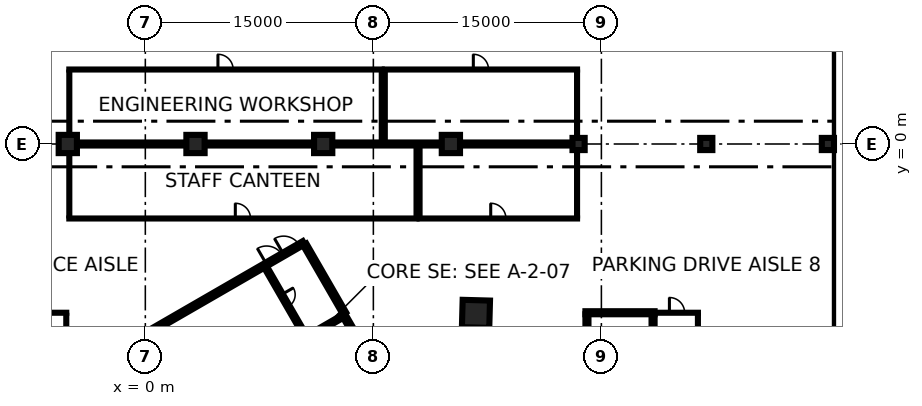
"""IFC4 building model, lengths in metres.
Left out: names, types, materials, properties, quantities, classifications, styles, units other than length and angle.
Written with IfcOpenShell. Run it as: python <this file> out.ifc"""

import sys

from ifc_helpers import new_model, si_unit, direction, frame, frame_2d, origin, origin_2d, place, context, subcontext, project, spatial, rectangle, extrude, element, fill, save


model = new_model("IFC4")
c1 = context("Model", 3, precision=1e-05, world=origin(), true_north=direction((0.0, 1.0)))
c2 = subcontext(c1, "Body", "Model", "MODEL_VIEW")
j1 = project(units=[si_unit("LENGTHUNIT", "METRE"), si_unit("PLANEANGLEUNIT", "RADIAN")], contexts=[c1])
p1 = place(None, origin())
s1 = spatial("IfcSite", under=j1, at=p1, CompositionType="ELEMENT")
p2 = place(p1, origin())
s2 = spatial("IfcBuilding", under=s1, at=p2, CompositionType="ELEMENT")
p3 = place(p2, frame((0.0, 0.0, -12.0)))
s3 = spatial("IfcBuildingStorey", under=s2, at=p3, CompositionType="ELEMENT", Elevation=-12.0)
p4 = place(p3, frame((45.75, -80.0, 0.0), z_axis=(0.0, 0.0, 1.0), x_axis=(0.0, 1.0, 0.0)))
e1 = element("IfcWall", 1, at=p4, inside=s3, PredefinedType="USERDEFINED", context=c2, shape_type="SweptSolid", body=[
    extrude(rectangle(XDim=160.0, YDim=0.9, at=frame_2d((80.0, 0.0))), origin(), (0.0, 0.0, 1.0), 11.55),
])
p5 = place(p2, frame((0.0, 0.0, -3.6)))
s4 = spatial("IfcBuildingStorey", under=s2, at=p5, CompositionType="ELEMENT", Elevation=-3.6)
p6 = place(p5, frame((21.749, -11.174, -0.4), z_axis=(0.0, 0.0, 1.0), x_axis=(-0.999628128016, 0.02726913418, 0.0)))
e2 = element("IfcColumn", 2, at=p6, inside=s4, PredefinedType="COLUMN", context=c2, shape_type="SweptSolid", body=[
    extrude(rectangle(XDim=1.8, YDim=1.8, at=origin_2d()), origin(), (0.0, 0.0, 1.0), 3.55),
])
for number, where, z_axis, x_axis in (
    (3, (-5.1, 0.0, -0.4), (0.0, 0.0, 1.0), (1.0, 0.0, 0.0)),
    (4, (3.3, 0.0, -0.4), (0.0, 0.0, 1.0), (1.0, 0.0, 0.0)),
    (5, (11.7, 0.0, -0.4), (0.0, 0.0, 1.0), (1.0, 0.0, 0.0)),
    (6, (20.1, 0.0, -0.4), (0.0, 0.0, 1.0), (1.0, 0.0, 0.0)),
):
    element("IfcColumn", number, at=place(p5, frame(where, z_axis=z_axis, x_axis=x_axis)), inside=s4, PredefinedType="COLUMN", context=c2, shape_type="SweptSolid", body=[
        extrude(rectangle(XDim=1.2, YDim=1.2, at=origin_2d()), origin(), (0.0, 0.0, 1.0), 3.55),
    ])
for number, where, z_axis, x_axis in (
    (7, (28.5, 0.0, -0.4), (0.0, 0.0, 1.0), (1.0, 0.0, 0.0)),
    (8, (36.9, 0.0, -0.4), (0.0, 0.0, 1.0), (1.0, 0.0, 0.0)),
    (9, (44.9, 0.0, -0.4), (0.0, 0.0, 1.0), (1.0, 0.0, 0.0)),
):
    element("IfcColumn", number, at=place(p5, frame(where, z_axis=z_axis, x_axis=x_axis)), inside=s4, PredefinedType="COLUMN", context=c2, shape_type="SweptSolid", body=[
        extrude(rectangle(XDim=0.8, YDim=0.8, at=origin_2d()), origin(), (0.0, 0.0, 1.0), 3.55),
    ])
p7 = place(p5, frame((0.417, -12.273, 0.0), z_axis=(0.0, 0.0, 1.0), x_axis=(0.866021906294, 0.500006057782, 0.0)))
e10 = element("IfcWall", 10, at=p7, inside=s4, PredefinedType="SHEAR", context=c2, shape_type="SweptSolid", body=[
    extrude(rectangle(XDim=11.55, YDim=0.25, at=frame_2d((5.775, 0.0))), origin(), (0.0, 0.0, 1.0), 3.15),
])
p8 = place(p7, frame((10.025, 0.0, 0.0)))
e11 = element("IfcOpeningElement", 11, at=p8, cuts=e10, PredefinedType="OPENING", context=c2, shape_type="SweptSolid", body=[
    extrude(rectangle(XDim=1.2, YDim=2.1, at=frame_2d((0.6, 1.05))), frame((0.0, 0.135, 0.0), z_axis=(0.0, -1.0, 0.0), x_axis=(1.0, 0.0, 0.0)), (0.0, 0.0, 1.0), 0.27),
])
p9 = place(p7, frame((8.725, 0.0, 0.0)))
e12 = element("IfcOpeningElement", 12, at=p9, cuts=e10, PredefinedType="OPENING", context=c2, shape_type="SweptSolid", body=[
    extrude(rectangle(XDim=1.2, YDim=2.1, at=frame_2d((0.6, 1.05))), frame((0.0, 0.135, 0.0), z_axis=(0.0, -1.0, 0.0), x_axis=(1.0, 0.0, 0.0)), (0.0, 0.0, 1.0), 0.27),
])
p10 = place(p5, frame((13.008, -11.181, 0.0), z_axis=(0.0, 0.0, 1.0), x_axis=(0.500004234368, -0.866022959057, 0.0)))
e13 = element("IfcWall", 13, at=p10, inside=s4, PredefinedType="SHEAR", context=c2, shape_type="SweptSolid", body=[
    extrude(rectangle(XDim=6.25, YDim=0.25, at=frame_2d((3.125, 0.0))), origin(), (0.0, 0.0, 1.0), 3.15),
])
p11 = place(p5, frame((10.483, -6.606, 0.0), z_axis=(0.0, 0.0, 1.0), x_axis=(0.49999885962, -0.866026062182, 0.0)))
e14 = element("IfcWall", 14, at=p11, inside=s4, PredefinedType="SHEAR", context=c2, shape_type="SweptSolid", body=[
    extrude(rectangle(XDim=5.225, YDim=0.25, at=frame_2d((2.612, 0.0))), origin(), (0.0, 0.0, 1.0), 3.15),
])
p12 = place(p5, frame((7.906, -8.094, 0.0), z_axis=(0.0, 0.0, 1.0), x_axis=(0.500012186204, -0.866018367962, 0.0)))
e15 = element("IfcWall", 15, at=p12, inside=s4, PredefinedType="SHEAR", context=c2, shape_type="SweptSolid", body=[
    extrude(rectangle(XDim=5.349, YDim=0.2, at=frame_2d((2.674, 0.0))), origin(), (0.0, 0.0, 1.0), 3.15),
])
p13 = place(p12, frame((2.099, 0.0, 0.0)))
e16 = element("IfcOpeningElement", 16, at=p13, cuts=e15, PredefinedType="OPENING", context=c2, shape_type="SweptSolid", body=[
    extrude(rectangle(XDim=0.9, YDim=2.1, at=frame_2d((0.45, 1.05))), frame((0.0, 0.11, 0.0), z_axis=(0.0, -1.0, 0.0), x_axis=(1.0, 0.0, 0.0)), (0.0, 0.0, 1.0), 0.22),
])
p14 = place(p5, frame((10.668, -12.677, 0.0), z_axis=(0.0, 0.0, 1.0), x_axis=(0.866016748302, 0.500014991436, 0.0)))
e17 = element("IfcWall", 17, at=p14, inside=s4, PredefinedType="SHEAR", context=c2, shape_type="SweptSolid", body=[
    extrude(rectangle(XDim=2.649, YDim=0.2, at=frame_2d((1.324, 0.0))), origin(), (0.0, 0.0, 1.0), 3.15),
])
p15 = place(p14, frame((0.65, 0.0, 0.0)))
e18 = element("IfcOpeningElement", 18, at=p15, cuts=e17, PredefinedType="OPENING", context=c2, shape_type="SweptSolid", body=[
    extrude(rectangle(XDim=1.3, YDim=2.1, at=frame_2d((0.65, 1.05))), frame((0.0, 0.11, 0.0), z_axis=(0.0, -1.0, 0.0), x_axis=(1.0, 0.0, 0.0)), (0.0, 0.0, 1.0), 0.22),
])
p16 = place(p5, frame((-13.5, -11.1, 0.0), z_axis=(0.0, 0.0, 1.0), x_axis=(1.0, 0.0, 0.0)))
e19 = element("IfcWall", 19, at=p16, inside=s4, PredefinedType="PARTITIONING", context=c2, shape_type="SweptSolid", body=[
    extrude(rectangle(XDim=8.4, YDim=0.2, at=frame_2d((4.2, 0.0))), origin(), (0.0, 0.0, 1.0), 3.15),
])
p17 = place(p16, frame((3.7, 0.0, 0.0)))
e20 = element("IfcOpeningElement", 20, at=p17, cuts=e19, PredefinedType="OPENING", context=c2, shape_type="SweptSolid", body=[
    extrude(rectangle(XDim=1.0, YDim=2.1, at=frame_2d((0.5, 1.05))), frame((0.0, 0.11, 0.0), z_axis=(0.0, -1.0, 0.0), x_axis=(1.0, 0.0, 0.0)), (0.0, 0.0, 1.0), 0.22),
])
p18 = place(p5, frame((-5.2, -15.4, 0.0), z_axis=(0.0, 0.0, 1.0), x_axis=(0.0, 1.0, 0.0)))
e21 = element("IfcWall", 21, at=p18, inside=s4, PredefinedType="PARTITIONING", context=c2, shape_type="SweptSolid", body=[
    extrude(rectangle(XDim=4.2, YDim=0.2, at=frame_2d((2.1, 0.0))), origin(), (0.0, 0.0, 1.0), 3.15),
])
p19 = place(p5, frame((-5.1, -4.9, 0.0), z_axis=(0.0, 0.0, 1.0), x_axis=(1.0, 0.0, 0.0)))
e22 = element("IfcWall", 22, at=p19, inside=s4, PredefinedType="PARTITIONING", context=c2, shape_type="SweptSolid", body=[
    extrude(rectangle(XDim=23.04, YDim=0.2, at=frame_2d((11.52, 0.0))), origin(), (0.0, 0.0, 1.0), 3.15),
])
p20 = place(p19, frame((11.02, 0.0, 0.0)))
e23 = element("IfcOpeningElement", 23, at=p20, cuts=e22, PredefinedType="OPENING", context=c2, shape_type="SweptSolid", body=[
    extrude(rectangle(XDim=1.0, YDim=2.1, at=frame_2d((0.5, 1.05))), frame((0.0, 0.11, 0.0), z_axis=(0.0, -1.0, 0.0), x_axis=(1.0, 0.0, 0.0)), (0.0, 0.0, 1.0), 0.22),
])
p21 = place(p5, frame((-5.1, -0.1, 0.0), z_axis=(0.0, 0.0, 1.0), x_axis=(1.0, 0.0, 0.0)))
e24 = element("IfcWall", 24, at=p21, inside=s4, PredefinedType="PARTITIONING", context=c2, shape_type="SweptSolid", body=[
    extrude(rectangle(XDim=23.04, YDim=0.2, at=frame_2d((11.52, 0.0))), origin(), (0.0, 0.0, 1.0), 3.15),
])
p22 = place(p5, frame((-5.0, -4.8, 0.0), z_axis=(0.0, 0.0, 1.0), x_axis=(0.0, 1.0, 0.0)))
e25 = element("IfcWall", 25, at=p22, inside=s4, PredefinedType="PARTITIONING", context=c2, shape_type="SweptSolid", body=[
    extrude(rectangle(XDim=4.2, YDim=0.2, at=frame_2d((2.1, 0.0))), origin(), (0.0, 0.0, 1.0), 3.15),
])
p23 = place(p5, frame((17.84, -4.8, 0.0), z_axis=(0.0, 0.0, 1.0), x_axis=(0.0, 1.0, 0.0)))
e26 = element("IfcWall", 26, at=p23, inside=s4, PredefinedType="PARTITIONING", context=c2, shape_type="SweptSolid", body=[
    extrude(rectangle(XDim=4.6, YDim=0.2, at=frame_2d((2.3, 0.0))), origin(), (0.0, 0.0, 1.0), 3.15),
])
p24 = place(p5, frame((17.94, -4.9, 0.0), z_axis=(0.0, 0.0, 1.0), x_axis=(1.0, 0.0, 0.0)))
e27 = element("IfcWall", 27, at=p24, inside=s4, PredefinedType="PARTITIONING", context=c2, shape_type="SweptSolid", body=[
    extrude(rectangle(XDim=10.56, YDim=0.2, at=frame_2d((5.28, 0.0))), origin(), (0.0, 0.0, 1.0), 3.15),
])
p25 = place(p24, frame((4.78, 0.0, 0.0)))
e28 = element("IfcOpeningElement", 28, at=p25, cuts=e27, PredefinedType="OPENING", context=c2, shape_type="SweptSolid", body=[
    extrude(rectangle(XDim=1.0, YDim=2.1, at=frame_2d((0.5, 1.05))), frame((0.0, 0.11, 0.0), z_axis=(0.0, -1.0, 0.0), x_axis=(1.0, 0.0, 0.0)), (0.0, 0.0, 1.0), 0.22),
])
p26 = place(p5, frame((17.94, -0.1, 0.0), z_axis=(0.0, 0.0, 1.0), x_axis=(1.0, 0.0, 0.0)))
e29 = element("IfcWall", 29, at=p26, inside=s4, PredefinedType="PARTITIONING", context=c2, shape_type="SweptSolid", body=[
    extrude(rectangle(XDim=10.56, YDim=0.2, at=frame_2d((5.28, 0.0))), origin(), (0.0, 0.0, 1.0), 3.15),
])
p27 = place(p5, frame((18.04, -4.8, 0.0), z_axis=(0.0, 0.0, 1.0), x_axis=(0.0, 1.0, 0.0)))
e30 = element("IfcWall", 30, at=p27, inside=s4, PredefinedType="PARTITIONING", context=c2, shape_type="SweptSolid", body=[
    extrude(rectangle(XDim=4.6, YDim=0.2, at=frame_2d((2.3, 0.0))), origin(), (0.0, 0.0, 1.0), 3.15),
])
p28 = place(p5, frame((28.4, -4.8, 0.0), z_axis=(0.0, 0.0, 1.0), x_axis=(0.0, 1.0, 0.0)))
e31 = element("IfcWall", 31, at=p28, inside=s4, PredefinedType="PARTITIONING", context=c2, shape_type="SweptSolid", body=[
    extrude(rectangle(XDim=4.4, YDim=0.2, at=frame_2d((2.2, 0.0))), origin(), (0.0, 0.0, 1.0), 3.15),
])
p29 = place(p5, frame((-5.1, 0.1, 0.0), z_axis=(0.0, 0.0, 1.0), x_axis=(1.0, 0.0, 0.0)))
e32 = element("IfcWall", 32, at=p29, inside=s4, PredefinedType="PARTITIONING", context=c2, shape_type="SweptSolid", body=[
    extrude(rectangle(XDim=20.753, YDim=0.2, at=frame_2d((10.376, 0.0))), origin(), (0.0, 0.0, 1.0), 3.15),
])
p30 = place(p5, frame((-5.1, 4.9, 0.0), z_axis=(0.0, 0.0, 1.0), x_axis=(1.0, 0.0, 0.0)))
e33 = element("IfcWall", 33, at=p30, inside=s4, PredefinedType="PARTITIONING", context=c2, shape_type="SweptSolid", body=[
    extrude(rectangle(XDim=20.753, YDim=0.2, at=frame_2d((10.376, 0.0))), origin(), (0.0, 0.0, 1.0), 3.15),
])
p31 = place(p30, frame((9.876, 0.0, 0.0)))
e34 = element("IfcOpeningElement", 34, at=p31, cuts=e33, PredefinedType="OPENING", context=c2, shape_type="SweptSolid", body=[
    extrude(rectangle(XDim=1.0, YDim=2.1, at=frame_2d((0.5, 1.05))), frame((0.0, 0.11, 0.0), z_axis=(0.0, -1.0, 0.0), x_axis=(1.0, 0.0, 0.0)), (0.0, 0.0, 1.0), 0.22),
])
p32 = place(p5, frame((-5.0, 0.6, 0.0), z_axis=(0.0, 0.0, 1.0), x_axis=(0.0, 1.0, 0.0)))
e35 = element("IfcWall", 35, at=p32, inside=s4, PredefinedType="PARTITIONING", context=c2, shape_type="SweptSolid", body=[
    extrude(rectangle(XDim=4.2, YDim=0.2, at=frame_2d((2.1, 0.0))), origin(), (0.0, 0.0, 1.0), 3.15),
])
p33 = place(p5, frame((15.553, 0.2, 0.0), z_axis=(0.0, 0.0, 1.0), x_axis=(0.0, 1.0, 0.0)))
e36 = element("IfcWall", 36, at=p33, inside=s4, PredefinedType="PARTITIONING", context=c2, shape_type="SweptSolid", body=[
    extrude(rectangle(XDim=4.6, YDim=0.2, at=frame_2d((2.3, 0.0))), origin(), (0.0, 0.0, 1.0), 3.15),
])
p34 = place(p5, frame((15.653, 0.1, 0.0), z_axis=(0.0, 0.0, 1.0), x_axis=(1.0, 0.0, 0.0)))
e37 = element("IfcWall", 37, at=p34, inside=s4, PredefinedType="PARTITIONING", context=c2, shape_type="SweptSolid", body=[
    extrude(rectangle(XDim=12.847, YDim=0.2, at=frame_2d((6.424, 0.0))), origin(), (0.0, 0.0, 1.0), 3.15),
])
p35 = place(p5, frame((15.653, 4.9, 0.0), z_axis=(0.0, 0.0, 1.0), x_axis=(1.0, 0.0, 0.0)))
e38 = element("IfcWall", 38, at=p35, inside=s4, PredefinedType="PARTITIONING", context=c2, shape_type="SweptSolid", body=[
    extrude(rectangle(XDim=12.847, YDim=0.2, at=frame_2d((6.424, 0.0))), origin(), (0.0, 0.0, 1.0), 3.15),
])
p36 = place(p35, frame((5.924, 0.0, 0.0)))
e39 = element("IfcOpeningElement", 39, at=p36, cuts=e38, PredefinedType="OPENING", context=c2, shape_type="SweptSolid", body=[
    extrude(rectangle(XDim=1.0, YDim=2.1, at=frame_2d((0.5, 1.05))), frame((0.0, 0.11, 0.0), z_axis=(0.0, -1.0, 0.0), x_axis=(1.0, 0.0, 0.0)), (0.0, 0.0, 1.0), 0.22),
])
p37 = place(p5, frame((15.753, 0.2, 0.0), z_axis=(0.0, 0.0, 1.0), x_axis=(0.0, 1.0, 0.0)))
e40 = element("IfcWall", 40, at=p37, inside=s4, PredefinedType="PARTITIONING", context=c2, shape_type="SweptSolid", body=[
    extrude(rectangle(XDim=4.6, YDim=0.2, at=frame_2d((2.3, 0.0))), origin(), (0.0, 0.0, 1.0), 3.15),
])
p38 = place(p5, frame((28.4, 0.4, 0.0), z_axis=(0.0, 0.0, 1.0), x_axis=(0.0, 1.0, 0.0)))
e41 = element("IfcWall", 41, at=p38, inside=s4, PredefinedType="PARTITIONING", context=c2, shape_type="SweptSolid", body=[
    extrude(rectangle(XDim=4.4, YDim=0.2, at=frame_2d((2.2, 0.0))), origin(), (0.0, 0.0, 1.0), 3.15),
])
p39 = place(p5, frame((33.5, -11.1, 0.0), z_axis=(0.0, 0.0, 1.0), x_axis=(1.0, 0.0, 0.0)))
e42 = element("IfcWall", 42, at=p39, inside=s4, PredefinedType="PARTITIONING", context=c2, shape_type="SweptSolid", body=[
    extrude(rectangle(XDim=2.95, YDim=0.2, at=frame_2d((1.475, 0.0))), origin(), (0.0, 0.0, 1.0), 3.15),
])
p40 = place(p39, frame((0.975, 0.0, 0.0)))
e43 = element("IfcOpeningElement", 43, at=p40, cuts=e42, PredefinedType="OPENING", context=c2, shape_type="SweptSolid", body=[
    extrude(rectangle(XDim=1.0, YDim=2.1, at=frame_2d((0.5, 1.05))), frame((0.0, 0.11, 0.0), z_axis=(0.0, -1.0, 0.0), x_axis=(1.0, 0.0, 0.0)), (0.0, 0.0, 1.0), 0.22),
])
p41 = place(p5, frame((36.35, -16.8, 0.0), z_axis=(0.0, 0.0, 1.0), x_axis=(0.0, 1.0, 0.0)))
e44 = element("IfcWall", 44, at=p41, inside=s4, PredefinedType="PARTITIONING", context=c2, shape_type="SweptSolid", body=[
    extrude(rectangle(XDim=5.6, YDim=0.2, at=frame_2d((2.8, 0.0))), origin(), (0.0, 0.0, 1.0), 3.15),
])
p42 = place(p5, frame((29.05, -20.8, 0.0), z_axis=(0.0, 0.0, 1.0), x_axis=(0.0, 1.0, 0.0)))
e45 = element("IfcWall", 45, at=p42, inside=s4, PredefinedType="SOLIDWALL", context=c2, shape_type="SweptSolid", body=[
    extrude(rectangle(XDim=9.6, YDim=0.2, at=frame_2d((4.8, 0.0))), origin(), (0.0, 0.0, 1.0), 3.15),
])
p43 = place(p5, frame((33.4, -20.8, 0.0), z_axis=(0.0, 0.0, 1.0), x_axis=(0.0, 1.0, 0.0)))
e46 = element("IfcWall", 46, at=p43, inside=s4, PredefinedType="SOLIDWALL", context=c2, shape_type="SweptSolid", body=[
    extrude(rectangle(XDim=9.6, YDim=0.2, at=frame_2d((4.8, 0.0))), origin(), (0.0, 0.0, 1.0), 3.15),
])
p44 = place(p43, frame((0.4, 0.0, 0.0)))
e47 = element("IfcOpeningElement", 47, at=p44, cuts=e46, PredefinedType="OPENING", context=c2, shape_type="SweptSolid", body=[
    extrude(rectangle(XDim=1.2, YDim=2.1, at=frame_2d((0.6, 1.05))), frame((0.0, 0.11, 0.0), z_axis=(0.0, -1.0, 0.0), x_axis=(1.0, 0.0, 0.0)), (0.0, 0.0, 1.0), 0.22),
])
p45 = place(p5, frame((28.95, -11.1, 0.0), z_axis=(0.0, 0.0, 1.0), x_axis=(1.0, 0.0, 0.0)))
e48 = element("IfcWall", 48, at=p45, inside=s4, PredefinedType="SOLIDWALL", context=c2, shape_type="SweptSolid", body=[
    extrude(rectangle(XDim=4.55, YDim=0.2, at=frame_2d((2.275, 0.0))), origin(), (0.0, 0.0, 1.0), 3.15),
])
p46 = place(p15, origin())
e49 = element("IfcDoor", 49, at=p46, inside=s4, OperationType="SLIDING_TO_LEFT", PredefinedType="DOOR", context=c2, shape_type="SweptSolid", body=[
    extrude(rectangle(XDim=1.3, YDim=2.1, at=frame_2d((0.65, 1.05))), frame((0.0, 0.025, 0.0), z_axis=(0.0, -1.0, 0.0), x_axis=(1.0, 0.0, 0.0)), (0.0, 0.0, 1.0), 0.05),
])
fill(e18, e49)
p47 = place(p8, origin())
e50 = element("IfcDoor", 50, at=p47, inside=s4, OperationType="SINGLE_SWING_LEFT", PredefinedType="DOOR", context=c2, shape_type="SweptSolid", body=[
    extrude(rectangle(XDim=1.2, YDim=2.1, at=frame_2d((0.6, 1.05))), frame((0.0, 0.025, 0.0), z_axis=(0.0, -1.0, 0.0), x_axis=(1.0, 0.0, 0.0)), (0.0, 0.0, 1.0), 0.05),
])
fill(e11, e50)
p48 = place(p9, origin())
e51 = element("IfcDoor", 51, at=p48, inside=s4, OperationType="SINGLE_SWING_RIGHT", PredefinedType="DOOR", context=c2, shape_type="SweptSolid", body=[
    extrude(rectangle(XDim=1.2, YDim=2.1, at=frame_2d((0.6, 1.05))), frame((0.0, 0.025, 0.0), z_axis=(0.0, -1.0, 0.0), x_axis=(1.0, 0.0, 0.0)), (0.0, 0.0, 1.0), 0.05),
])
fill(e12, e51)
p49 = place(p13, origin())
e52 = element("IfcDoor", 52, at=p49, inside=s4, OperationType="SINGLE_SWING_LEFT", PredefinedType="DOOR", context=c2, shape_type="SweptSolid", body=[
    extrude(rectangle(XDim=0.9, YDim=2.1, at=frame_2d((0.45, 1.05))), frame((0.0, 0.025, 0.0), z_axis=(0.0, -1.0, 0.0), x_axis=(1.0, 0.0, 0.0)), (0.0, 0.0, 1.0), 0.05),
])
fill(e16, e52)
p50 = place(p20, origin())
e53 = element("IfcDoor", 53, at=p50, inside=s4, OperationType="SINGLE_SWING_LEFT", PredefinedType="DOOR", context=c2, shape_type="SweptSolid", body=[
    extrude(rectangle(XDim=1.0, YDim=2.1, at=frame_2d((0.5, 1.05))), frame((0.0, 0.025, 0.0), z_axis=(0.0, -1.0, 0.0), x_axis=(1.0, 0.0, 0.0)), (0.0, 0.0, 1.0), 0.05),
])
fill(e23, e53)
p51 = place(p25, origin())
e54 = element("IfcDoor", 54, at=p51, inside=s4, OperationType="SINGLE_SWING_LEFT", PredefinedType="DOOR", context=c2, shape_type="SweptSolid", body=[
    extrude(rectangle(XDim=1.0, YDim=2.1, at=frame_2d((0.5, 1.05))), frame((0.0, 0.025, 0.0), z_axis=(0.0, -1.0, 0.0), x_axis=(1.0, 0.0, 0.0)), (0.0, 0.0, 1.0), 0.05),
])
fill(e28, e54)
p52 = place(p31, origin())
e55 = element("IfcDoor", 55, at=p52, inside=s4, OperationType="SINGLE_SWING_LEFT", PredefinedType="DOOR", context=c2, shape_type="SweptSolid", body=[
    extrude(rectangle(XDim=1.0, YDim=2.1, at=frame_2d((0.5, 1.05))), frame((0.0, 0.025, 0.0), z_axis=(0.0, -1.0, 0.0), x_axis=(1.0, 0.0, 0.0)), (0.0, 0.0, 1.0), 0.05),
])
fill(e34, e55)
p53 = place(p36, origin())
e56 = element("IfcDoor", 56, at=p53, inside=s4, OperationType="SINGLE_SWING_LEFT", PredefinedType="DOOR", context=c2, shape_type="SweptSolid", body=[
    extrude(rectangle(XDim=1.0, YDim=2.1, at=frame_2d((0.5, 1.05))), frame((0.0, 0.025, 0.0), z_axis=(0.0, -1.0, 0.0), x_axis=(1.0, 0.0, 0.0)), (0.0, 0.0, 1.0), 0.05),
])
fill(e39, e56)
p54 = place(p40, origin())
e57 = element("IfcDoor", 57, at=p54, inside=s4, OperationType="SINGLE_SWING_LEFT", PredefinedType="DOOR", context=c2, shape_type="SweptSolid", body=[
    extrude(rectangle(XDim=1.0, YDim=2.1, at=frame_2d((0.5, 1.05))), frame((0.0, 0.025, 0.0), z_axis=(0.0, -1.0, 0.0), x_axis=(1.0, 0.0, 0.0)), (0.0, 0.0, 1.0), 0.05),
])
fill(e43, e57)
save(model, sys.argv[1])
